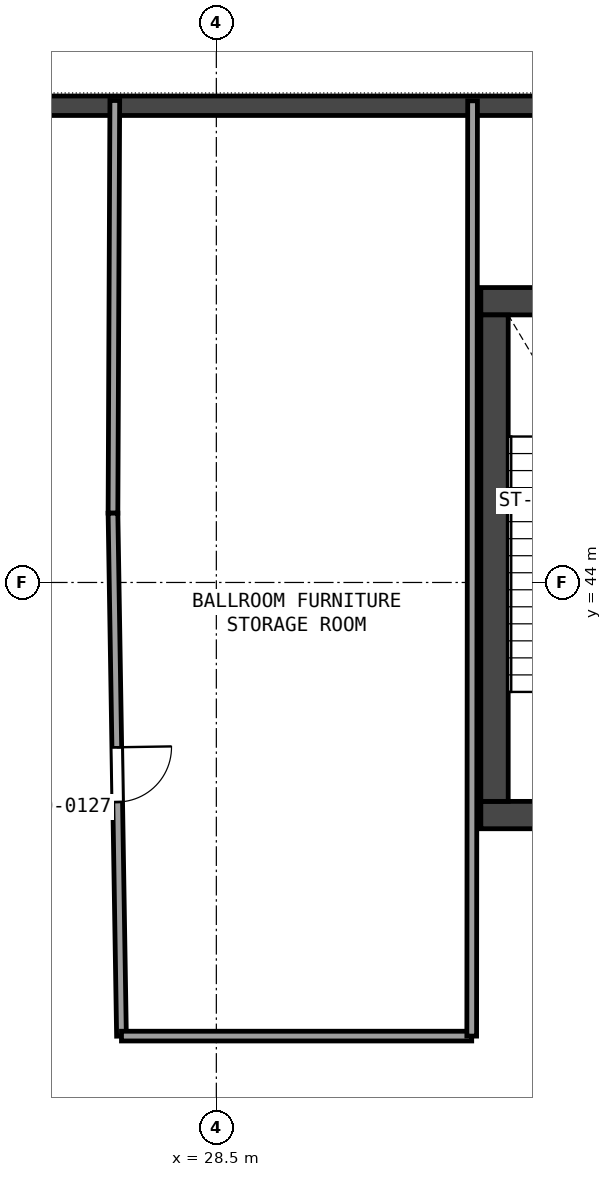
"""IFC4 building model, lengths in metres.
Left out: names, types, materials, properties, quantities, classifications, styles, units other than length and angle.
Written with IfcOpenShell. Run it as: python <this file> out.ifc"""

import sys

from ifc_helpers import new_model, si_unit, direction, frame, frame_2d, origin, place, context, subcontext, project, spatial, rectangle, extrude, element, fill, save


model = new_model("IFC4")
c1 = context("Model", 3, precision=1e-05, world=origin(), true_north=direction((0.0, 1.0)))
c2 = subcontext(c1, "Body", "Model", "MODEL_VIEW")
j1 = project(units=[si_unit("LENGTHUNIT", "METRE"), si_unit("PLANEANGLEUNIT", "RADIAN")], contexts=[c1])
p1 = place(None, origin())
s1 = spatial("IfcSite", under=j1, at=p1, CompositionType="ELEMENT")
p2 = place(p1, origin())
s2 = spatial("IfcBuilding", under=s1, at=p2, CompositionType="ELEMENT")
p3 = place(p2, frame((0.0, 0.0, 5.4)))
s3 = spatial("IfcBuildingStorey", under=s2, at=p3, CompositionType="ELEMENT", Elevation=5.4)
for number, where, z_axis, x_axis in (
    (1, (32.85, 40.175, 0.0), (0.0, 0.0, 1.0), (1.0, 0.0, 0.0)),
    (2, (32.85, 48.625, 0.0), (0.0, 0.0, 1.0), (1.0, 0.0, 0.0)),
):
    element("IfcWall", number, at=place(p3, frame(where, z_axis=z_axis, x_axis=x_axis)), inside=s3, PredefinedType="SHEAR", context=c2, shape_type="SweptSolid", body=[
        extrude(rectangle(XDim=4.6, YDim=0.45, at=frame_2d((2.3, 0.0))), origin(), (0.0, 0.0, 1.0), 5.05),
    ])
p4 = place(p3, frame((33.075, 40.4, 0.0), z_axis=(0.0, 0.0, 1.0), x_axis=(0.0, 1.0, 0.0)))
e3 = element("IfcWall", 3, at=p4, inside=s3, PredefinedType="SHEAR", context=c2, shape_type="SweptSolid", body=[
    extrude(rectangle(XDim=8.0, YDim=0.45, at=frame_2d((4.0, 0.0))), origin(), (0.0, 0.0, 1.0), 5.05),
])
p5 = place(p3, frame((1.96, 51.84, 0.0), z_axis=(0.0, 0.0, 1.0), x_axis=(1.0, 0.0, 0.0)))
e4 = element("IfcWall", 4, at=p5, inside=s3, PredefinedType="SOLIDWALL", context=c2, shape_type="SweptSolid", body=[
    extrude(rectangle(XDim=72.08, YDim=0.32, at=frame_2d((36.04, 0.0))), origin(), (0.0, 0.0, 1.0), 5.05),
])
p6 = place(p5, frame((14.658, 0.0, 0.95)))
e5 = element("IfcOpeningElement", 5, at=p6, cuts=e4, PredefinedType="OPENING", context=c2, shape_type="SweptSolid", body=[
    extrude(rectangle(XDim=2.4, YDim=2.5, at=frame_2d((1.2, 1.25))), frame((0.0, 0.17, 0.0), z_axis=(0.0, -1.0, 0.0), x_axis=(1.0, 0.0, 0.0)), (0.0, 0.0, 1.0), 0.34),
])
p7 = place(p5, frame((33.398, 0.0, 0.95)))
e6 = element("IfcOpeningElement", 6, at=p7, cuts=e4, PredefinedType="OPENING", context=c2, shape_type="SweptSolid", body=[
    extrude(rectangle(XDim=2.4, YDim=2.5, at=frame_2d((1.2, 1.25))), frame((0.0, 0.17, 0.0), z_axis=(0.0, -1.0, 0.0), x_axis=(1.0, 0.0, 0.0)), (0.0, 0.0, 1.0), 0.34),
])
p8 = place(p5, frame((52.139, 0.0, 0.95)))
e7 = element("IfcOpeningElement", 7, at=p8, cuts=e4, PredefinedType="OPENING", context=c2, shape_type="SweptSolid", body=[
    extrude(rectangle(XDim=2.4, YDim=2.5, at=frame_2d((1.2, 1.25))), frame((0.0, 0.17, 0.0), z_axis=(0.0, -1.0, 0.0), x_axis=(1.0, 0.0, 0.0)), (0.0, 0.0, 1.0), 0.34),
])
p9 = place(p3, frame((26.83, 51.926, 0.0), z_axis=(0.0, 0.0, 1.0), x_axis=(-0.004425053812, -0.999990209401, 0.0)))
e8 = element("IfcWall", 8, at=p9, inside=s3, PredefinedType="PARTITIONING", context=c2, shape_type="SweptSolid", body=[
    extrude(rectangle(XDim=6.786, YDim=0.16, at=frame_2d((3.393, 0.0))), origin(), (0.0, 0.0, 1.0), 4.123),
])
p10 = place(p3, frame((26.8, 45.14, 0.0), z_axis=(0.0, 0.0, 1.0), x_axis=(0.016264704162, -0.99986772095, 0.0)))
e9 = element("IfcWall", 9, at=p10, inside=s3, PredefinedType="PARTITIONING", context=c2, shape_type="SweptSolid", body=[
    extrude(rectangle(XDim=8.601, YDim=0.16, at=frame_2d((4.301, 0.0))), origin(), (0.0, 0.0, 1.0), 5.05),
])
p11 = place(p10, frame((3.851, 0.0, 0.0)))
e10 = element("IfcOpeningElement", 10, at=p11, cuts=e9, PredefinedType="OPENING", context=c2, shape_type="SweptSolid", body=[
    extrude(rectangle(XDim=0.9, YDim=2.0, at=frame_2d((0.45, 1.0))), frame((0.0, 0.09, 0.0), z_axis=(0.0, -1.0, 0.0), x_axis=(1.0, 0.0, 0.0)), (0.0, 0.0, 1.0), 0.18),
])
p12 = place(p3, frame((26.94, 36.54, 0.0), z_axis=(0.0, 0.0, 1.0), x_axis=(1.0, 0.0, 0.0)))
e11 = element("IfcWall", 11, at=p12, inside=s3, PredefinedType="PARTITIONING", context=c2, shape_type="SweptSolid", body=[
    extrude(rectangle(XDim=5.76, YDim=0.16, at=frame_2d((2.88, 0.0))), origin(), (0.0, 0.0, 1.0), 5.05),
])
p13 = place(p3, frame((32.7, 36.54, 0.0), z_axis=(0.0, 0.0, 1.0), x_axis=(0.00092063453, 0.999999576216, 0.0)))
e12 = element("IfcWall", 12, at=p13, inside=s3, PredefinedType="PARTITIONING", context=c2, shape_type="SweptSolid", body=[
    extrude(rectangle(XDim=15.381, YDim=0.16, at=frame_2d((7.69, 0.0))), origin(), (0.0, 0.0, 1.0), 4.123),
])
p14 = place(p11, origin())
e13 = element("IfcDoor", 13, at=p14, inside=s3, OperationType="SINGLE_SWING_LEFT", PredefinedType="DOOR", context=c2, shape_type="SweptSolid", body=[
    extrude(rectangle(XDim=0.9, YDim=2.0, at=frame_2d((0.45, 1.0))), frame((0.0, 0.025, 0.0), z_axis=(0.0, -1.0, 0.0), x_axis=(1.0, 0.0, 0.0)), (0.0, 0.0, 1.0), 0.05),
])
fill(e10, e13)
save(model, sys.argv[1])
